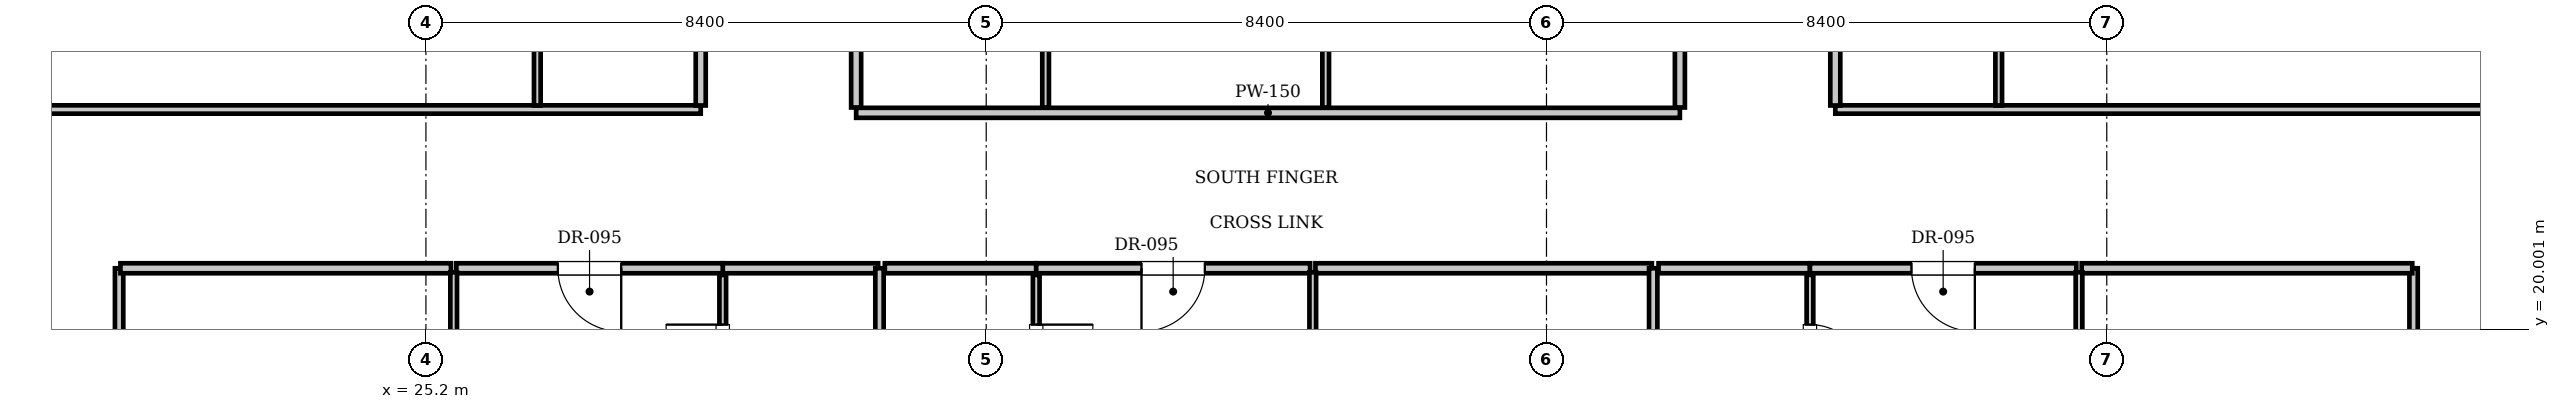
"""IFC4 building model, lengths in metres.
Left out: names, types, materials, properties, quantities, classifications, styles, units other than length and angle.
Written with IfcOpenShell. Run it as: python <this file> out.ifc"""

import sys

from ifc_helpers import new_model, si_unit, direction, frame, frame_2d, origin, place, context, subcontext, project, spatial, rectangle, extrude, element, fill, save


model = new_model("IFC4")
c1 = context("Model", 3, precision=1e-05, world=origin(), true_north=direction((0.0, 1.0)))
c2 = subcontext(c1, "Body", "Model", "MODEL_VIEW")
j1 = project(units=[si_unit("LENGTHUNIT", "METRE"), si_unit("PLANEANGLEUNIT", "RADIAN")], contexts=[c1])
p1 = place(None, origin())
s1 = spatial("IfcSite", under=j1, at=p1, CompositionType="ELEMENT")
p2 = place(p1, origin())
s2 = spatial("IfcBuilding", under=s1, at=p2, CompositionType="ELEMENT")
p3 = place(p2, frame((0.0, 0.0, 297.15)))
s3 = spatial("IfcBuildingStorey", under=s2, at=p3, CompositionType="ELEMENT", Elevation=297.15)
p4 = place(p3, frame((31.65, 23.25, 0.0), z_axis=(0.0, 0.0, 1.0), x_axis=(1.0, 0.0, 0.0)))
e1 = element("IfcWall", 1, at=p4, inside=s3, PredefinedType="PARTITIONING", context=c2, shape_type="SweptSolid", body=[
    extrude(rectangle(XDim=12.35, YDim=0.15, at=frame_2d((6.175, 0.0))), origin(), (0.0, 0.0, 1.0), 3.61),
])
for number, where, z_axis, x_axis in (
    (2, (31.65, 23.33, 0.0), (0.0, 0.0, 1.0), (0.0, 1.0, 0.0)),
    (3, (44.0, 23.33, 0.0), (0.0, 0.0, 1.0), (0.0, 1.0, 0.0)),
):
    element("IfcWall", number, at=place(p3, frame(where, z_axis=z_axis, x_axis=x_axis)), inside=s3, PredefinedType="PARTITIONING", context=c2, shape_type="SweptSolid", body=[
        extrude(rectangle(XDim=8.29, YDim=0.15, at=frame_2d((4.145, 0.0))), origin(), (0.0, 0.0, 1.0), 3.61),
    ])
for number, where, z_axis, x_axis in (
    (4, (34.49, 23.33, 0.0), (0.0, 0.0, 1.0), (0.0, 1.0, 0.0)),
    (5, (38.689, 23.33, 0.0), (0.0, 0.0, 1.0), (0.0, 1.0, 0.0)),
):
    element("IfcWall", number, at=place(p3, frame(where, z_axis=z_axis, x_axis=x_axis)), inside=s3, PredefinedType="PARTITIONING", context=c2, shape_type="SweptSolid", body=[
        extrude(rectangle(XDim=8.29, YDim=0.1, at=frame_2d((4.145, 0.0))), origin(), (0.0, 0.0, 1.0), 3.61),
    ])
for number, where, z_axis, x_axis in (
    (6, (20.6, 14.4, 0.0), (0.0, 0.0, 1.0), (0.0, 1.0, 0.0)),
    (7, (55.0, 14.4, 0.0), (0.0, 0.0, 1.0), (0.0, 1.0, 0.0)),
):
    element("IfcWall", number, at=place(p3, frame(where, z_axis=z_axis, x_axis=x_axis)), inside=s3, PredefinedType="PARTITIONING", context=c2, shape_type="SweptSolid", body=[
        extrude(rectangle(XDim=6.52, YDim=0.125, at=frame_2d((3.26, 0.0))), origin(), (0.0, 0.0, 1.0), 3.61),
    ])
p5 = place(p3, frame((29.65, 20.92, 0.0), z_axis=(0.0, 0.0, 1.0), x_axis=(1.0, 0.0, 0.0)))
e8 = element("IfcWall", 8, at=p5, inside=s3, PredefinedType="PARTITIONING", context=c2, shape_type="SweptSolid", body=[
    extrude(rectangle(XDim=2.33, YDim=0.15, at=frame_2d((1.165, 0.0))), origin(), (0.0, 0.0, 1.0), 3.61),
])
p6 = place(p3, frame((29.65, 18.48, 0.0), z_axis=(0.0, 0.0, 1.0), x_axis=(0.0, 1.0, 0.0)))
e9 = element("IfcWall", 9, at=p6, inside=s3, PredefinedType="PARTITIONING", context=c2, shape_type="SweptSolid", body=[
    extrude(rectangle(XDim=2.34, YDim=0.1, at=frame_2d((1.17, 0.0))), origin(), (0.0, 0.0, 1.0), 3.61),
])
p7 = place(p6, frame((0.745, 0.0, 0.0)))
e10 = element("IfcOpeningElement", 10, at=p7, cuts=e9, PredefinedType="OPENING", context=c2, shape_type="SweptSolid", body=[
    extrude(rectangle(XDim=0.85, YDim=2.1, at=frame_2d((0.425, 1.05))), frame((0.0, 0.06, 0.0), z_axis=(0.0, -1.0, 0.0), x_axis=(1.0, 0.0, 0.0)), (0.0, 0.0, 1.0), 0.12),
])
p8 = place(p3, frame((20.62, 20.92, 0.0), z_axis=(0.0, 0.0, 1.0), x_axis=(1.0, 0.0, 0.0)))
e11 = element("IfcWall", 11, at=p8, inside=s3, PredefinedType="PARTITIONING", context=c2, shape_type="SweptSolid", body=[
    extrude(rectangle(XDim=4.956, YDim=0.15, at=frame_2d((2.478, 0.0))), origin(), (0.0, 0.0, 1.0), 3.61),
])
p9 = place(p3, frame((25.656, 20.92, 0.0), z_axis=(0.0, 0.0, 1.0), x_axis=(1.0, 0.0, 0.0)))
e12 = element("IfcWall", 12, at=p9, inside=s3, PredefinedType="PARTITIONING", context=c2, shape_type="SweptSolid", body=[
    extrude(rectangle(XDim=3.994, YDim=0.15, at=frame_2d((1.997, 0.0))), origin(), (0.0, 0.0, 1.0), 3.61),
])
p10 = place(p9, frame((1.522, 0.0, 0.0)))
e13 = element("IfcOpeningElement", 13, at=p10, cuts=e12, PredefinedType="OPENING", context=c2, shape_type="SweptSolid", body=[
    extrude(rectangle(XDim=0.95, YDim=2.15, at=frame_2d((0.475, 1.075))), frame((0.0, 0.085, 0.0), z_axis=(0.0, -1.0, 0.0), x_axis=(1.0, 0.0, 0.0)), (0.0, 0.0, 1.0), 0.17),
])
p11 = place(p3, frame((25.616, 9.23, 0.0), z_axis=(0.0, 0.0, 1.0), x_axis=(0.0, 1.0, 0.0)))
e14 = element("IfcWall", 14, at=p11, inside=s3, PredefinedType="PARTITIONING", context=c2, shape_type="SweptSolid", body=[
    extrude(rectangle(XDim=11.63, YDim=0.1, at=frame_2d((5.815, 0.0))), origin(), (0.0, 0.0, 1.0), 3.61),
])
p12 = place(p11, frame((1.6, 0.0, 0.0)))
e15 = element("IfcOpeningElement", 15, at=p12, cuts=e14, PredefinedType="OPENING", context=c2, shape_type="SweptSolid", body=[
    extrude(rectangle(XDim=0.9, YDim=2.1, at=frame_2d((0.45, 1.05))), frame((0.0, 0.06, 0.0), z_axis=(0.0, -1.0, 0.0), x_axis=(1.0, 0.0, 0.0)), (0.0, 0.0, 1.0), 0.12),
])
p13 = place(p3, frame((32.0, 9.3, 0.0), z_axis=(0.0, 0.0, 1.0), x_axis=(0.0, 1.0, 0.0)))
e16 = element("IfcWall", 16, at=p13, inside=s3, PredefinedType="PARTITIONING", context=c2, shape_type="SweptSolid", body=[
    extrude(rectangle(XDim=11.62, YDim=0.125, at=frame_2d((5.81, 0.0))), origin(), (0.0, 0.0, 1.0), 3.61),
])
p14 = place(p3, frame((32.08, 20.92, 0.0), z_axis=(0.0, 0.0, 1.0), x_axis=(1.0, 0.0, 0.0)))
e17 = element("IfcWall", 17, at=p14, inside=s3, PredefinedType="PARTITIONING", context=c2, shape_type="SweptSolid", body=[
    extrude(rectangle(XDim=2.27, YDim=0.15, at=frame_2d((1.135, 0.0))), origin(), (0.0, 0.0, 1.0), 3.61),
])
p15 = place(p3, frame((34.35, 18.48, 0.0), z_axis=(0.0, 0.0, 1.0), x_axis=(0.0, 1.0, 0.0)))
e18 = element("IfcWall", 18, at=p15, inside=s3, PredefinedType="PARTITIONING", context=c2, shape_type="SweptSolid", body=[
    extrude(rectangle(XDim=2.34, YDim=0.1, at=frame_2d((1.17, 0.0))), origin(), (0.0, 0.0, 1.0), 3.61),
])
p16 = place(p15, frame((0.745, 0.0, 0.0)))
e19 = element("IfcOpeningElement", 19, at=p16, cuts=e18, PredefinedType="OPENING", context=c2, shape_type="SweptSolid", body=[
    extrude(rectangle(XDim=0.85, YDim=2.1, at=frame_2d((0.425, 1.05))), frame((0.0, 0.06, 0.0), z_axis=(0.0, -1.0, 0.0), x_axis=(1.0, 0.0, 0.0)), (0.0, 0.0, 1.0), 0.12),
])
p17 = place(p3, frame((34.35, 20.92, 0.0), z_axis=(0.0, 0.0, 1.0), x_axis=(1.0, 0.0, 0.0)))
e20 = element("IfcWall", 20, at=p17, inside=s3, PredefinedType="PARTITIONING", context=c2, shape_type="SweptSolid", body=[
    extrude(rectangle(XDim=4.106, YDim=0.15, at=frame_2d((2.053, 0.0))), origin(), (0.0, 0.0, 1.0), 3.61),
])
p18 = place(p17, frame((1.578, 0.0, 0.0)))
e21 = element("IfcOpeningElement", 21, at=p18, cuts=e20, PredefinedType="OPENING", context=c2, shape_type="SweptSolid", body=[
    extrude(rectangle(XDim=0.95, YDim=2.15, at=frame_2d((0.475, 1.075))), frame((0.0, 0.085, 0.0), z_axis=(0.0, -1.0, 0.0), x_axis=(1.0, 0.0, 0.0)), (0.0, 0.0, 1.0), 0.17),
])
p19 = place(p3, frame((38.536, 20.92, 0.0), z_axis=(0.0, 0.0, 1.0), x_axis=(1.0, 0.0, 0.0)))
e22 = element("IfcWall", 22, at=p19, inside=s3, PredefinedType="PARTITIONING", context=c2, shape_type="SweptSolid", body=[
    extrude(rectangle(XDim=5.044, YDim=0.15, at=frame_2d((2.522, 0.0))), origin(), (0.0, 0.0, 1.0), 3.61),
])
p20 = place(p3, frame((38.496, 9.23, 0.0), z_axis=(0.0, 0.0, 1.0), x_axis=(0.0, 1.0, 0.0)))
e23 = element("IfcWall", 23, at=p20, inside=s3, PredefinedType="PARTITIONING", context=c2, shape_type="SweptSolid", body=[
    extrude(rectangle(XDim=11.63, YDim=0.1, at=frame_2d((5.815, 0.0))), origin(), (0.0, 0.0, 1.0), 3.61),
])
p21 = place(p20, frame((1.6, 0.0, 0.0)))
e24 = element("IfcOpeningElement", 24, at=p21, cuts=e23, PredefinedType="OPENING", context=c2, shape_type="SweptSolid", body=[
    extrude(rectangle(XDim=0.9, YDim=2.1, at=frame_2d((0.45, 1.05))), frame((0.0, 0.06, 0.0), z_axis=(0.0, -1.0, 0.0), x_axis=(1.0, 0.0, 0.0)), (0.0, 0.0, 1.0), 0.12),
])
p22 = place(p3, frame((43.6, 9.3, 0.0), z_axis=(0.0, 0.0, 1.0), x_axis=(0.0, 1.0, 0.0)))
e25 = element("IfcWall", 25, at=p22, inside=s3, PredefinedType="PARTITIONING", context=c2, shape_type="SweptSolid", body=[
    extrude(rectangle(XDim=11.62, YDim=0.125, at=frame_2d((5.81, 0.0))), origin(), (0.0, 0.0, 1.0), 3.61),
])
p23 = place(p3, frame((43.68, 20.92, 0.0), z_axis=(0.0, 0.0, 1.0), x_axis=(1.0, 0.0, 0.0)))
e26 = element("IfcWall", 26, at=p23, inside=s3, PredefinedType="PARTITIONING", context=c2, shape_type="SweptSolid", body=[
    extrude(rectangle(XDim=2.27, YDim=0.15, at=frame_2d((1.135, 0.0))), origin(), (0.0, 0.0, 1.0), 3.61),
])
p24 = place(p3, frame((45.95, 18.48, 0.0), z_axis=(0.0, 0.0, 1.0), x_axis=(0.0, 1.0, 0.0)))
e27 = element("IfcWall", 27, at=p24, inside=s3, PredefinedType="PARTITIONING", context=c2, shape_type="SweptSolid", body=[
    extrude(rectangle(XDim=2.34, YDim=0.1, at=frame_2d((1.17, 0.0))), origin(), (0.0, 0.0, 1.0), 3.61),
])
p25 = place(p24, frame((0.745, 0.0, 0.0)))
e28 = element("IfcOpeningElement", 28, at=p25, cuts=e27, PredefinedType="OPENING", context=c2, shape_type="SweptSolid", body=[
    extrude(rectangle(XDim=0.85, YDim=2.1, at=frame_2d((0.425, 1.05))), frame((0.0, 0.06, 0.0), z_axis=(0.0, -1.0, 0.0), x_axis=(1.0, 0.0, 0.0)), (0.0, 0.0, 1.0), 0.12),
])
p26 = place(p3, frame((45.95, 20.92, 0.0), z_axis=(0.0, 0.0, 1.0), x_axis=(1.0, 0.0, 0.0)))
e29 = element("IfcWall", 29, at=p26, inside=s3, PredefinedType="PARTITIONING", context=c2, shape_type="SweptSolid", body=[
    extrude(rectangle(XDim=3.994, YDim=0.15, at=frame_2d((1.997, 0.0))), origin(), (0.0, 0.0, 1.0), 3.61),
])
p27 = place(p26, frame((1.522, 0.0, 0.0)))
e30 = element("IfcOpeningElement", 30, at=p27, cuts=e29, PredefinedType="OPENING", context=c2, shape_type="SweptSolid", body=[
    extrude(rectangle(XDim=0.95, YDim=2.15, at=frame_2d((0.475, 1.075))), frame((0.0, 0.085, 0.0), z_axis=(0.0, -1.0, 0.0), x_axis=(1.0, 0.0, 0.0)), (0.0, 0.0, 1.0), 0.17),
])
p28 = place(p3, frame((50.024, 20.92, 0.0), z_axis=(0.0, 0.0, 1.0), x_axis=(1.0, 0.0, 0.0)))
e31 = element("IfcWall", 31, at=p28, inside=s3, PredefinedType="PARTITIONING", context=c2, shape_type="SweptSolid", body=[
    extrude(rectangle(XDim=4.956, YDim=0.15, at=frame_2d((2.478, 0.0))), origin(), (0.0, 0.0, 1.0), 3.61),
])
p29 = place(p3, frame((49.984, 9.23, 0.0), z_axis=(0.0, 0.0, 1.0), x_axis=(0.0, 1.0, 0.0)))
e32 = element("IfcWall", 32, at=p29, inside=s3, PredefinedType="PARTITIONING", context=c2, shape_type="SweptSolid", body=[
    extrude(rectangle(XDim=11.63, YDim=0.1, at=frame_2d((5.815, 0.0))), origin(), (0.0, 0.0, 1.0), 3.61),
])
p30 = place(p29, frame((1.6, 0.0, 0.0)))
e33 = element("IfcOpeningElement", 33, at=p30, cuts=e32, PredefinedType="OPENING", context=c2, shape_type="SweptSolid", body=[
    extrude(rectangle(XDim=0.9, YDim=2.1, at=frame_2d((0.45, 1.05))), frame((0.0, 0.06, 0.0), z_axis=(0.0, -1.0, 0.0), x_axis=(1.0, 0.0, 0.0)), (0.0, 0.0, 1.0), 0.12),
])
p31 = place(p3, frame((15.5, 23.3, 0.0), z_axis=(0.0, 0.0, 1.0), x_axis=(1.0, 0.0, 0.0)))
e34 = element("IfcWall", 34, at=p31, inside=s3, PredefinedType="PARTITIONING", context=c2, shape_type="SweptSolid", body=[
    extrude(rectangle(XDim=13.82, YDim=0.125, at=frame_2d((6.91, 0.0))), origin(), (0.0, 0.0, 1.0), 3.61),
])
p32 = place(p3, frame((46.33, 23.3, 0.0), z_axis=(0.0, 0.0, 1.0), x_axis=(1.0, 0.0, 0.0)))
e35 = element("IfcWall", 35, at=p32, inside=s3, PredefinedType="PARTITIONING", context=c2, shape_type="SweptSolid", body=[
    extrude(rectangle(XDim=13.77, YDim=0.125, at=frame_2d((6.885, 0.0))), origin(), (0.0, 0.0, 1.0), 3.61),
])
p33 = place(p3, frame((29.32, 23.36, 0.0), z_axis=(0.0, 0.0, 1.0), x_axis=(0.0, 1.0, 0.0)))
e36 = element("IfcWall", 36, at=p33, inside=s3, PredefinedType="PARTITIONING", context=c2, shape_type="SweptSolid", body=[
    extrude(rectangle(XDim=1.89, YDim=0.15, at=frame_2d((0.945, 0.0))), origin(), (0.0, 0.0, 1.0), 3.61),
])
p34 = place(p3, frame((26.87, 23.36, 0.0), z_axis=(0.0, 0.0, 1.0), x_axis=(0.0, 1.0, 0.0)))
e37 = element("IfcWall", 37, at=p34, inside=s3, PredefinedType="PARTITIONING", context=c2, shape_type="SweptSolid", body=[
    extrude(rectangle(XDim=1.89, YDim=0.1, at=frame_2d((0.945, 0.0))), origin(), (0.0, 0.0, 1.0), 3.61),
])
p35 = place(p3, frame((46.33, 23.36, 0.0), z_axis=(0.0, 0.0, 1.0), x_axis=(0.0, 1.0, 0.0)))
e38 = element("IfcWall", 38, at=p35, inside=s3, PredefinedType="PARTITIONING", context=c2, shape_type="SweptSolid", body=[
    extrude(rectangle(XDim=1.89, YDim=0.15, at=frame_2d((0.945, 0.0))), origin(), (0.0, 0.0, 1.0), 3.61),
])
p36 = place(p3, frame((48.78, 23.36, 0.0), z_axis=(0.0, 0.0, 1.0), x_axis=(0.0, 1.0, 0.0)))
e39 = element("IfcWall", 39, at=p36, inside=s3, PredefinedType="PARTITIONING", context=c2, shape_type="SweptSolid", body=[
    extrude(rectangle(XDim=1.89, YDim=0.1, at=frame_2d((0.945, 0.0))), origin(), (0.0, 0.0, 1.0), 3.61),
])
p37 = place(p7, origin())
e40 = element("IfcDoor", 40, at=p37, inside=s3, OperationType="SINGLE_SWING_RIGHT", PredefinedType="DOOR", context=c2, shape_type="SweptSolid", body=[
    extrude(rectangle(XDim=0.85, YDim=2.1, at=frame_2d((0.425, 1.05))), frame((0.0, 0.025, 0.0), z_axis=(0.0, -1.0, 0.0), x_axis=(1.0, 0.0, 0.0)), (0.0, 0.0, 1.0), 0.05),
])
fill(e10, e40)
p38 = place(p10, frame((0.95, 0.0, 0.0), z_axis=(0.0, 0.0, 1.0), x_axis=(-1.0, 0.0, 0.0)))
e41 = element("IfcDoor", 41, at=p38, inside=s3, OperationType="SINGLE_SWING_LEFT", PredefinedType="DOOR", context=c2, shape_type="SweptSolid", body=[
    extrude(rectangle(XDim=0.95, YDim=2.15, at=frame_2d((0.475, 1.075))), frame((0.0, 0.025, 0.0), z_axis=(0.0, -1.0, 0.0), x_axis=(1.0, 0.0, 0.0)), (0.0, 0.0, 1.0), 0.05),
])
fill(e13, e41)
p39 = place(p16, frame((0.85, 0.0, 0.0), z_axis=(0.0, 0.0, 1.0), x_axis=(-1.0, 0.0, 0.0)))
e42 = element("IfcDoor", 42, at=p39, inside=s3, OperationType="SINGLE_SWING_LEFT", PredefinedType="DOOR", context=c2, shape_type="SweptSolid", body=[
    extrude(rectangle(XDim=0.85, YDim=2.1, at=frame_2d((0.425, 1.05))), frame((0.0, 0.025, 0.0), z_axis=(0.0, -1.0, 0.0), x_axis=(1.0, 0.0, 0.0)), (0.0, 0.0, 1.0), 0.05),
])
fill(e19, e42)
p40 = place(p18, frame((0.95, 0.0, 0.0), z_axis=(0.0, 0.0, 1.0), x_axis=(-1.0, 0.0, 0.0)))
e43 = element("IfcDoor", 43, at=p40, inside=s3, OperationType="SINGLE_SWING_RIGHT", PredefinedType="DOOR", context=c2, shape_type="SweptSolid", body=[
    extrude(rectangle(XDim=0.95, YDim=2.15, at=frame_2d((0.475, 1.075))), frame((0.0, 0.025, 0.0), z_axis=(0.0, -1.0, 0.0), x_axis=(1.0, 0.0, 0.0)), (0.0, 0.0, 1.0), 0.05),
])
fill(e21, e43)
p41 = place(p25, frame((0.85, 0.0, 0.0), z_axis=(0.0, 0.0, 1.0), x_axis=(-1.0, 0.0, 0.0)))
e44 = element("IfcDoor", 44, at=p41, inside=s3, OperationType="SINGLE_SWING_RIGHT", PredefinedType="DOOR", context=c2, shape_type="SweptSolid", body=[
    extrude(rectangle(XDim=0.85, YDim=2.1, at=frame_2d((0.425, 1.05))), frame((0.0, 0.025, 0.0), z_axis=(0.0, -1.0, 0.0), x_axis=(1.0, 0.0, 0.0)), (0.0, 0.0, 1.0), 0.05),
])
fill(e28, e44)
p42 = place(p27, frame((0.95, 0.0, 0.0), z_axis=(0.0, 0.0, 1.0), x_axis=(-1.0, 0.0, 0.0)))
e45 = element("IfcDoor", 45, at=p42, inside=s3, OperationType="SINGLE_SWING_LEFT", PredefinedType="DOOR", context=c2, shape_type="SweptSolid", body=[
    extrude(rectangle(XDim=0.95, YDim=2.15, at=frame_2d((0.475, 1.075))), frame((0.0, 0.025, 0.0), z_axis=(0.0, -1.0, 0.0), x_axis=(1.0, 0.0, 0.0)), (0.0, 0.0, 1.0), 0.05),
])
fill(e30, e45)
save(model, sys.argv[1])
